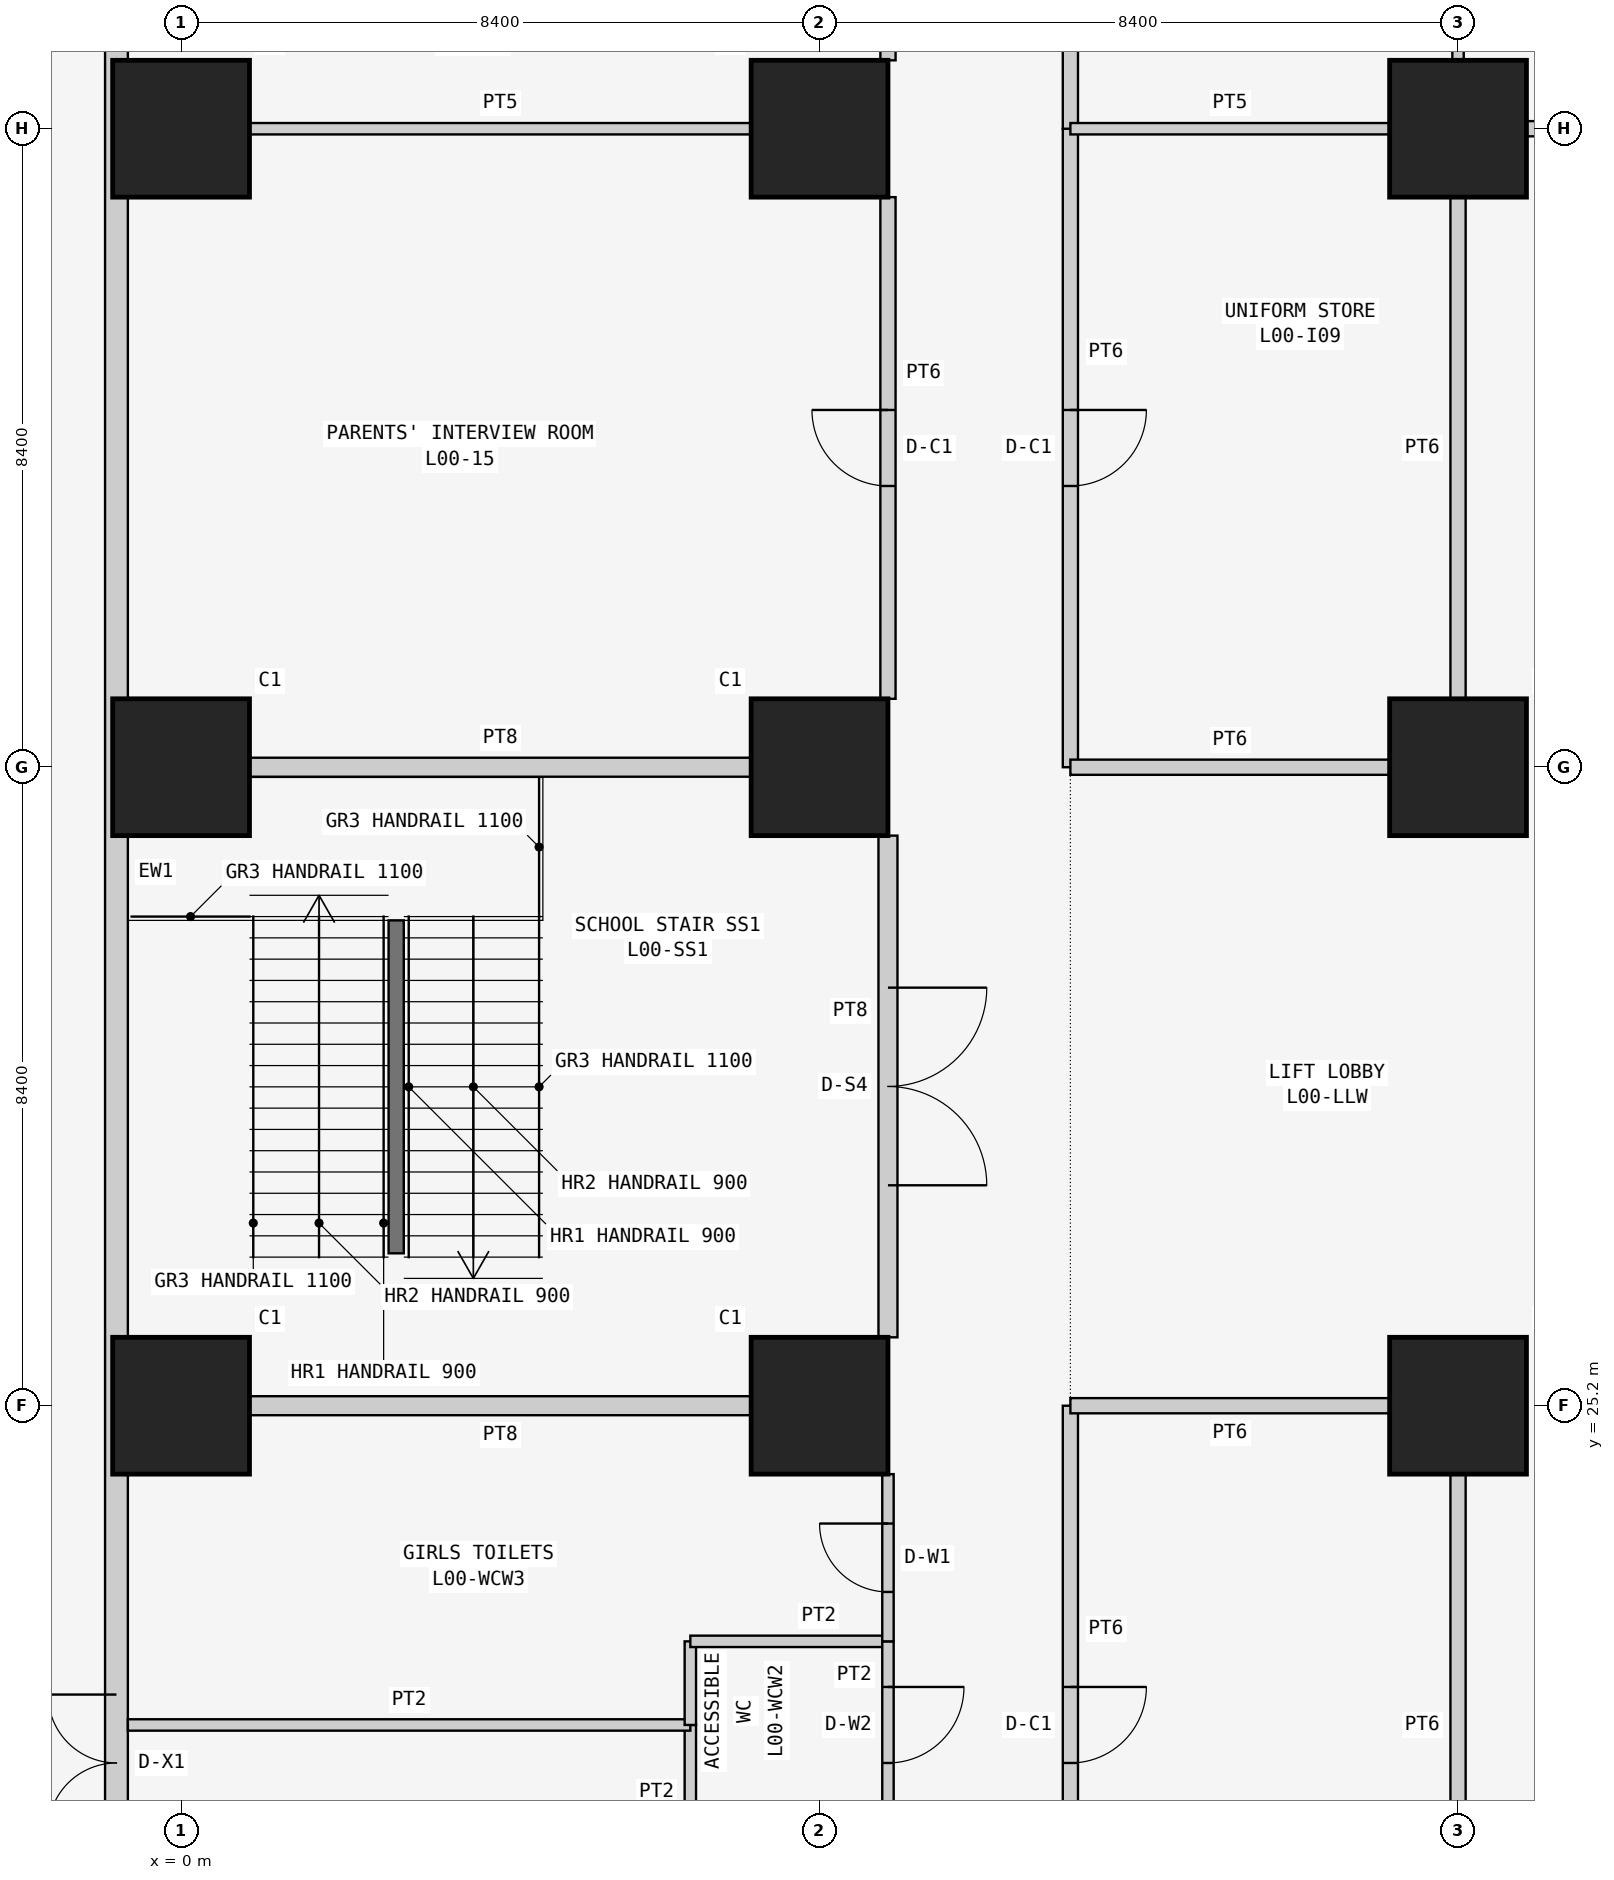
"""IFC4 building model, lengths in metres.
Left out: names, types, materials, properties, quantities, classifications, styles, units other than length and angle.
Written with IfcOpenShell. Run it as: python <this file> out.ifc"""

import sys

from ifc_helpers import new_model, si_unit, direction, frame, frame_2d, origin, origin_2d, place, context, subcontext, project, spatial, rectangle, extrude, element, fill, save


model = new_model("IFC4")
c1 = context("Model", 3, precision=1e-05, world=origin(), true_north=direction((0.0, 1.0)))
c2 = subcontext(c1, "Body", "Model", "MODEL_VIEW")
j1 = project(units=[si_unit("LENGTHUNIT", "METRE"), si_unit("PLANEANGLEUNIT", "RADIAN")], contexts=[c1])
p1 = place(None, origin())
s1 = spatial("IfcSite", under=j1, at=p1, CompositionType="ELEMENT")
p2 = place(p1, origin())
s2 = spatial("IfcBuilding", under=s1, at=p2, CompositionType="ELEMENT")
p3 = place(p2, origin())
s3 = spatial("IfcBuildingStorey", under=s2, at=p3, CompositionType="ELEMENT", Elevation=0.0)
for number, where, z_axis, x_axis in (
    (1, (0.0, 25.2, 0.0), (0.0, 0.0, 1.0), (1.0, 0.0, 0.0)),
    (2, (0.0, 33.6, 0.0), (0.0, 0.0, 1.0), (1.0, 0.0, 0.0)),
    (3, (0.0, 42.0, 0.0), (0.0, 0.0, 1.0), (1.0, 0.0, 0.0)),
    (4, (8.4, 25.2, 0.0), (0.0, 0.0, 1.0), (1.0, 0.0, 0.0)),
    (5, (8.4, 33.6, 0.0), (0.0, 0.0, 1.0), (1.0, 0.0, 0.0)),
    (6, (8.4, 42.0, 0.0), (0.0, 0.0, 1.0), (1.0, 0.0, 0.0)),
    (7, (16.8, 25.2, 0.0), (0.0, 0.0, 1.0), (1.0, 0.0, 0.0)),
    (8, (16.8, 33.6, 0.0), (0.0, 0.0, 1.0), (1.0, 0.0, 0.0)),
    (9, (16.8, 42.0, 0.0), (0.0, 0.0, 1.0), (1.0, 0.0, 0.0)),
):
    element("IfcColumn", number, at=place(p3, frame(where, z_axis=z_axis, x_axis=x_axis)), inside=s3, PredefinedType="COLUMN", context=c2, shape_type="SweptSolid", body=[
        extrude(rectangle(XDim=1.8, YDim=1.8, at=origin_2d()), origin(), (0.0, 0.0, 1.0), 6.0),
    ])
p4 = place(p3, frame((-0.85, 58.4, 0.0), z_axis=(0.0, 0.0, 1.0), x_axis=(0.0, -1.0, 0.0)))
e10 = element("IfcWall", 10, at=p4, inside=s3, PredefinedType="SOLIDWALL", context=c2, shape_type="SweptSolid", body=[
    extrude(rectangle(XDim=74.8, YDim=0.3, at=frame_2d((37.4, 0.0))), origin(), (0.0, 0.0, 1.0), 5.8),
])
p5 = place(p4, frame((68.0, 0.0, 0.0)))
e11 = element("IfcOpeningElement", 11, at=p5, cuts=e10, PredefinedType="OPENING", context=c2, shape_type="SweptSolid", body=[
    extrude(rectangle(XDim=1.8, YDim=2.4, at=frame_2d((0.9, 1.2))), frame((0.0, 0.16, 0.0), z_axis=(0.0, -1.0, 0.0), x_axis=(1.0, 0.0, 0.0)), (0.0, 0.0, 1.0), 0.32),
])
p6 = place(p4, frame((37.0, 0.0, 0.0)))
e12 = element("IfcOpeningElement", 12, at=p6, cuts=e10, PredefinedType="OPENING", context=c2, shape_type="SweptSolid", body=[
    extrude(rectangle(XDim=1.8, YDim=2.4, at=frame_2d((0.9, 1.2))), frame((0.0, 0.16, 0.0), z_axis=(0.0, -1.0, 0.0), x_axis=(1.0, 0.0, 0.0)), (0.0, 0.0, 1.0), 0.32),
])
p7 = place(p4, frame((11.0, 0.0, 0.0)))
e13 = element("IfcOpeningElement", 13, at=p7, cuts=e10, PredefinedType="OPENING", context=c2, shape_type="SweptSolid", body=[
    extrude(rectangle(XDim=1.8, YDim=2.4, at=frame_2d((0.9, 1.2))), frame((0.0, 0.16, 0.0), z_axis=(0.0, -1.0, 0.0), x_axis=(1.0, 0.0, 0.0)), (0.0, 0.0, 1.0), 0.32),
])
p8 = place(p3, frame((6.7, 21.0, 0.0), z_axis=(0.0, 0.0, 1.0), x_axis=(0.0, -1.0, 0.0)))
e14 = element("IfcWall", 14, at=p8, inside=s3, PredefinedType="PARTITIONING", context=c2, shape_type="SweptSolid", body=[
    extrude(rectangle(XDim=1.1, YDim=0.15, at=frame_2d((0.55, 0.0))), origin(), (0.0, 0.0, 1.0), 5.8),
])
p9 = place(p3, frame((-0.7, 21.0, 0.0), z_axis=(0.0, 0.0, 1.0), x_axis=(1.0, 0.0, 0.0)))
e15 = element("IfcWall", 15, at=p9, inside=s3, PredefinedType="PARTITIONING", context=c2, shape_type="SweptSolid", body=[
    extrude(rectangle(XDim=7.4, YDim=0.15, at=frame_2d((3.7, 0.0))), origin(), (0.0, 0.0, 1.0), 5.8),
])
p10 = place(p3, frame((6.7, 21.0, 0.0), z_axis=(0.0, 0.0, 1.0), x_axis=(0.0, 1.0, 0.0)))
e16 = element("IfcWall", 16, at=p10, inside=s3, PredefinedType="PARTITIONING", context=c2, shape_type="SweptSolid", body=[
    extrude(rectangle(XDim=1.1, YDim=0.15, at=frame_2d((0.55, 0.0))), origin(), (0.0, 0.0, 1.0), 5.8),
])
p11 = place(p3, frame((6.7, 22.1, 0.0), z_axis=(0.0, 0.0, 1.0), x_axis=(1.0, 0.0, 0.0)))
e17 = element("IfcWall", 17, at=p11, inside=s3, PredefinedType="PARTITIONING", context=c2, shape_type="SweptSolid", body=[
    extrude(rectangle(XDim=2.6, YDim=0.15, at=frame_2d((1.3, 0.0))), origin(), (0.0, 0.0, 1.0), 5.8),
])
p12 = place(p3, frame((9.3, 22.1, 0.0), z_axis=(0.0, 0.0, 1.0), x_axis=(0.0, -1.0, 0.0)))
e18 = element("IfcWall", 18, at=p12, inside=s3, PredefinedType="PARTITIONING", context=c2, shape_type="SweptSolid", body=[
    extrude(rectangle(XDim=2.2, YDim=0.15, at=frame_2d((1.1, 0.0))), origin(), (0.0, 0.0, 1.0), 5.8),
])
p13 = place(p12, frame((0.6, 0.0, 0.0)))
e19 = element("IfcOpeningElement", 19, at=p13, cuts=e18, PredefinedType="OPENING", context=c2, shape_type="SweptSolid", body=[
    extrude(rectangle(XDim=1.0, YDim=2.1, at=frame_2d((0.5, 1.05))), frame((0.0, 0.085, 0.0), z_axis=(0.0, -1.0, 0.0), x_axis=(1.0, 0.0, 0.0)), (0.0, 0.0, 1.0), 0.17),
])
p14 = place(p3, frame((0.9, 25.2, 0.0), z_axis=(0.0, 0.0, 1.0), x_axis=(1.0, 0.0, 0.0)))
e20 = element("IfcWall", 20, at=p14, inside=s3, PredefinedType="SOLIDWALL", context=c2, shape_type="SweptSolid", body=[
    extrude(rectangle(XDim=6.6, YDim=0.25, at=frame_2d((3.3, 0.0))), origin(), (0.0, 0.0, 1.0), 5.043),
])
p15 = place(p3, frame((9.3, 24.3, 0.0), z_axis=(0.0, 0.0, 1.0), x_axis=(0.0, -1.0, 0.0)))
e21 = element("IfcWall", 21, at=p15, inside=s3, PredefinedType="PARTITIONING", context=c2, shape_type="SweptSolid", body=[
    extrude(rectangle(XDim=2.2, YDim=0.15, at=frame_2d((1.1, 0.0))), origin(), (0.0, 0.0, 1.0), 5.8),
])
p16 = place(p15, frame((0.65, 0.0, 0.0)))
e22 = element("IfcOpeningElement", 22, at=p16, cuts=e21, PredefinedType="OPENING", context=c2, shape_type="SweptSolid", body=[
    extrude(rectangle(XDim=0.9, YDim=2.1, at=frame_2d((0.45, 1.05))), frame((0.0, 0.085, 0.0), z_axis=(0.0, -1.0, 0.0), x_axis=(1.0, 0.0, 0.0)), (0.0, 0.0, 1.0), 0.17),
])
p17 = place(p3, frame((0.9, 33.6, 0.0), z_axis=(0.0, 0.0, 1.0), x_axis=(1.0, 0.0, 0.0)))
e23 = element("IfcWall", 23, at=p17, inside=s3, PredefinedType="SOLIDWALL", context=c2, shape_type="SweptSolid", body=[
    extrude(rectangle(XDim=6.6, YDim=0.25, at=frame_2d((3.3, 0.0))), origin(), (0.0, 0.0, 1.0), 5.043),
])
p18 = place(p3, frame((9.3, 32.7, 0.0), z_axis=(0.0, 0.0, 1.0), x_axis=(0.0, -1.0, 0.0)))
e24 = element("IfcWall", 24, at=p18, inside=s3, PredefinedType="SOLIDWALL", context=c2, shape_type="SweptSolid", body=[
    extrude(rectangle(XDim=6.6, YDim=0.25, at=frame_2d((3.3, 0.0))), origin(), (0.0, 0.0, 1.0), 5.8),
])
p19 = place(p18, frame((2.0, 0.0, 0.0)))
e25 = element("IfcOpeningElement", 25, at=p19, cuts=e24, PredefinedType="OPENING", context=c2, shape_type="SweptSolid", body=[
    extrude(rectangle(XDim=2.6, YDim=2.4, at=frame_2d((1.3, 1.2))), frame((0.0, 0.135, 0.0), z_axis=(0.0, -1.0, 0.0), x_axis=(1.0, 0.0, 0.0)), (0.0, 0.0, 1.0), 0.27),
])
p20 = place(p3, frame((0.9, 42.0, 0.0), z_axis=(0.0, 0.0, 1.0), x_axis=(1.0, 0.0, 0.0)))
e26 = element("IfcWall", 26, at=p20, inside=s3, PredefinedType="PARTITIONING", context=c2, shape_type="SweptSolid", body=[
    extrude(rectangle(XDim=6.6, YDim=0.15, at=frame_2d((3.3, 0.0))), origin(), (0.0, 0.0, 1.0), 5.043),
])
p21 = place(p3, frame((9.3, 41.1, 0.0), z_axis=(0.0, 0.0, 1.0), x_axis=(0.0, -1.0, 0.0)))
e27 = element("IfcWall", 27, at=p21, inside=s3, PredefinedType="PARTITIONING", context=c2, shape_type="SweptSolid", body=[
    extrude(rectangle(XDim=6.6, YDim=0.2, at=frame_2d((3.3, 0.0))), origin(), (0.0, 0.0, 1.0), 5.8),
])
p22 = place(p21, frame((2.8, 0.0, 0.0)))
e28 = element("IfcOpeningElement", 28, at=p22, cuts=e27, PredefinedType="OPENING", context=c2, shape_type="SweptSolid", body=[
    extrude(rectangle(XDim=1.0, YDim=2.1, at=frame_2d((0.5, 1.05))), frame((0.0, 0.11, 0.0), z_axis=(0.0, -1.0, 0.0), x_axis=(1.0, 0.0, 0.0)), (0.0, 0.0, 1.0), 0.22),
])
p23 = place(p3, frame((9.3, 44.6, 0.0), z_axis=(0.0, 0.0, 1.0), x_axis=(0.0, -1.0, 0.0)))
e29 = element("IfcWall", 29, at=p23, inside=s3, PredefinedType="PARTITIONING", context=c2, shape_type="SweptSolid", body=[
    extrude(rectangle(XDim=1.7, YDim=0.2, at=frame_2d((0.85, 0.0))), origin(), (0.0, 0.0, 1.0), 5.8),
])
p24 = place(p23, frame((0.35, 0.0, 0.0)))
e30 = element("IfcOpeningElement", 30, at=p24, cuts=e29, PredefinedType="OPENING", context=c2, shape_type="SweptSolid", body=[
    extrude(rectangle(XDim=1.0, YDim=2.1, at=frame_2d((0.5, 1.05))), frame((0.0, 0.11, 0.0), z_axis=(0.0, -1.0, 0.0), x_axis=(1.0, 0.0, 0.0)), (0.0, 0.0, 1.0), 0.22),
])
p25 = place(p3, frame((11.7, 25.2, 0.0), z_axis=(0.0, 0.0, 1.0), x_axis=(0.0, -1.0, 0.0)))
e31 = element("IfcWall", 31, at=p25, inside=s3, PredefinedType="PARTITIONING", context=c2, shape_type="SweptSolid", body=[
    extrude(rectangle(XDim=8.4, YDim=0.2, at=frame_2d((4.2, 0.0))), origin(), (0.0, 0.0, 1.0), 5.8),
])
p26 = place(p25, frame((3.7, 0.0, 0.0)))
e32 = element("IfcOpeningElement", 32, at=p26, cuts=e31, PredefinedType="OPENING", context=c2, shape_type="SweptSolid", body=[
    extrude(rectangle(XDim=1.0, YDim=2.1, at=frame_2d((0.5, 1.05))), frame((0.0, 0.11, 0.0), z_axis=(0.0, -1.0, 0.0), x_axis=(1.0, 0.0, 0.0)), (0.0, 0.0, 1.0), 0.22),
])
p27 = place(p3, frame((11.7, 42.0, 0.0), z_axis=(0.0, 0.0, 1.0), x_axis=(0.0, -1.0, 0.0)))
e33 = element("IfcWall", 33, at=p27, inside=s3, PredefinedType="PARTITIONING", context=c2, shape_type="SweptSolid", body=[
    extrude(rectangle(XDim=8.4, YDim=0.2, at=frame_2d((4.2, 0.0))), origin(), (0.0, 0.0, 1.0), 5.8),
])
p28 = place(p27, frame((3.7, 0.0, 0.0)))
e34 = element("IfcOpeningElement", 34, at=p28, cuts=e33, PredefinedType="OPENING", context=c2, shape_type="SweptSolid", body=[
    extrude(rectangle(XDim=1.0, YDim=2.1, at=frame_2d((0.5, 1.05))), frame((0.0, 0.11, 0.0), z_axis=(0.0, -1.0, 0.0), x_axis=(1.0, 0.0, 0.0)), (0.0, 0.0, 1.0), 0.22),
])
p29 = place(p3, frame((11.7, 47.1, 0.0), z_axis=(0.0, 0.0, 1.0), x_axis=(0.0, -1.0, 0.0)))
e35 = element("IfcWall", 35, at=p29, inside=s3, PredefinedType="PARTITIONING", context=c2, shape_type="SweptSolid", body=[
    extrude(rectangle(XDim=5.1, YDim=0.2, at=frame_2d((2.55, 0.0))), origin(), (0.0, 0.0, 1.0), 5.8),
])
p30 = place(p3, frame((15.9, 25.2, 0.0), z_axis=(0.0, 0.0, 1.0), x_axis=(-1.0, 0.0, 0.0)))
e36 = element("IfcWall", 36, at=p30, inside=s3, PredefinedType="PARTITIONING", context=c2, shape_type="SweptSolid", body=[
    extrude(rectangle(XDim=4.2, YDim=0.2, at=frame_2d((2.1, 0.0))), origin(), (0.0, 0.0, 1.0), 5.043),
])
p31 = place(p3, frame((16.8, 17.7, 0.0), z_axis=(0.0, 0.0, 1.0), x_axis=(0.0, 1.0, 0.0)))
e37 = element("IfcWall", 37, at=p31, inside=s3, PredefinedType="PARTITIONING", context=c2, shape_type="SweptSolid", body=[
    extrude(rectangle(XDim=6.6, YDim=0.2, at=frame_2d((3.3, 0.0))), origin(), (0.0, 0.0, 1.0), 5.043),
])
p32 = place(p3, frame((11.7, 33.6, 0.0), z_axis=(0.0, 0.0, 1.0), x_axis=(1.0, 0.0, 0.0)))
e38 = element("IfcWall", 38, at=p32, inside=s3, PredefinedType="PARTITIONING", context=c2, shape_type="SweptSolid", body=[
    extrude(rectangle(XDim=4.2, YDim=0.2, at=frame_2d((2.1, 0.0))), origin(), (0.0, 0.0, 1.0), 5.043),
])
p33 = place(p3, frame((16.8, 34.5, 0.0), z_axis=(0.0, 0.0, 1.0), x_axis=(0.0, 1.0, 0.0)))
e39 = element("IfcWall", 39, at=p33, inside=s3, PredefinedType="PARTITIONING", context=c2, shape_type="SweptSolid", body=[
    extrude(rectangle(XDim=6.6, YDim=0.2, at=frame_2d((3.3, 0.0))), origin(), (0.0, 0.0, 1.0), 5.043),
])
p34 = place(p3, frame((17.7, 42.0, 0.0), z_axis=(0.0, 0.0, 1.0), x_axis=(1.0, 0.0, 0.0)))
e40 = element("IfcWall", 40, at=p34, inside=s3, PredefinedType="PARTITIONING", context=c2, shape_type="SweptSolid", body=[
    extrude(rectangle(XDim=2.8, YDim=0.2, at=frame_2d((1.4, 0.0))), origin(), (0.0, 0.0, 1.0), 5.043),
])
p35 = place(p3, frame((11.7, 42.0, 0.0), z_axis=(0.0, 0.0, 1.0), x_axis=(1.0, 0.0, 0.0)))
e41 = element("IfcWall", 41, at=p35, inside=s3, PredefinedType="PARTITIONING", context=c2, shape_type="SweptSolid", body=[
    extrude(rectangle(XDim=4.2, YDim=0.15, at=frame_2d((2.1, 0.0))), origin(), (0.0, 0.0, 1.0), 5.043),
])
p36 = place(p3, frame((16.8, 47.1, 0.0), z_axis=(0.0, 0.0, 1.0), x_axis=(0.0, -1.0, 0.0)))
e42 = element("IfcWall", 42, at=p36, inside=s3, PredefinedType="PARTITIONING", context=c2, shape_type="SweptSolid", body=[
    extrude(rectangle(XDim=4.2, YDim=0.15, at=frame_2d((2.1, 0.0))), origin(), (0.0, 0.0, 1.0), 5.043),
])
p37 = place(p3, frame((2.83, 27.205, 0.0), z_axis=(0.0, 0.0, 1.0), x_axis=(0.0, 1.0, 0.0)))
e43 = element("IfcWall", 43, at=p37, inside=s3, PredefinedType="SOLIDWALL", context=c2, shape_type="SweptSolid", body=[
    extrude(rectangle(XDim=4.38, YDim=0.2, at=frame_2d((2.19, 0.0))), origin(), (0.0, 0.0, 1.0), 6.0),
])
p38 = place(p6, frame((1.8, 0.0, 0.0), z_axis=(0.0, 0.0, 1.0), x_axis=(-1.0, 0.0, 0.0)))
e44 = element("IfcDoor", 44, at=p38, inside=s3, OperationType="DOUBLE_DOOR_SINGLE_SWING", PredefinedType="DOOR", context=c2, shape_type="SweptSolid", body=[
    extrude(rectangle(XDim=1.8, YDim=2.4, at=frame_2d((0.9, 1.2))), frame((0.0, 0.025, 0.0), z_axis=(0.0, -1.0, 0.0), x_axis=(1.0, 0.0, 0.0)), (0.0, 0.0, 1.0), 0.05),
])
fill(e12, e44)
p39 = place(p13, origin())
e45 = element("IfcDoor", 45, at=p39, inside=s3, OperationType="SINGLE_SWING_LEFT", PredefinedType="DOOR", context=c2, shape_type="SweptSolid", body=[
    extrude(rectangle(XDim=1.0, YDim=2.1, at=frame_2d((0.5, 1.05))), frame((0.0, 0.025, 0.0), z_axis=(0.0, -1.0, 0.0), x_axis=(1.0, 0.0, 0.0)), (0.0, 0.0, 1.0), 0.05),
])
fill(e19, e45)
p40 = place(p16, frame((0.9, 0.0, 0.0), z_axis=(0.0, 0.0, 1.0), x_axis=(-1.0, 0.0, 0.0)))
e46 = element("IfcDoor", 46, at=p40, inside=s3, OperationType="SINGLE_SWING_RIGHT", PredefinedType="DOOR", context=c2, shape_type="SweptSolid", body=[
    extrude(rectangle(XDim=0.9, YDim=2.1, at=frame_2d((0.45, 1.05))), frame((0.0, 0.025, 0.0), z_axis=(0.0, -1.0, 0.0), x_axis=(1.0, 0.0, 0.0)), (0.0, 0.0, 1.0), 0.05),
])
fill(e22, e46)
p41 = place(p19, origin())
e47 = element("IfcDoor", 47, at=p41, inside=s3, OperationType="DOUBLE_DOOR_SINGLE_SWING", PredefinedType="DOOR", context=c2, shape_type="SweptSolid", body=[
    extrude(rectangle(XDim=2.6, YDim=2.4, at=frame_2d((1.3, 1.2))), frame((0.0, 0.025, 0.0), z_axis=(0.0, -1.0, 0.0), x_axis=(1.0, 0.0, 0.0)), (0.0, 0.0, 1.0), 0.05),
])
fill(e25, e47)
p42 = place(p22, frame((1.0, 0.0, 0.0), z_axis=(0.0, 0.0, 1.0), x_axis=(-1.0, 0.0, 0.0)))
e48 = element("IfcDoor", 48, at=p42, inside=s3, OperationType="SINGLE_SWING_RIGHT", PredefinedType="DOOR", context=c2, shape_type="SweptSolid", body=[
    extrude(rectangle(XDim=1.0, YDim=2.1, at=frame_2d((0.5, 1.05))), frame((0.0, 0.025, 0.0), z_axis=(0.0, -1.0, 0.0), x_axis=(1.0, 0.0, 0.0)), (0.0, 0.0, 1.0), 0.05),
])
fill(e28, e48)
p43 = place(p26, origin())
e49 = element("IfcDoor", 49, at=p43, inside=s3, OperationType="SINGLE_SWING_LEFT", PredefinedType="DOOR", context=c2, shape_type="SweptSolid", body=[
    extrude(rectangle(XDim=1.0, YDim=2.1, at=frame_2d((0.5, 1.05))), frame((0.0, 0.025, 0.0), z_axis=(0.0, -1.0, 0.0), x_axis=(1.0, 0.0, 0.0)), (0.0, 0.0, 1.0), 0.05),
])
fill(e32, e49)
p44 = place(p28, origin())
e50 = element("IfcDoor", 50, at=p44, inside=s3, OperationType="SINGLE_SWING_LEFT", PredefinedType="DOOR", context=c2, shape_type="SweptSolid", body=[
    extrude(rectangle(XDim=1.0, YDim=2.1, at=frame_2d((0.5, 1.05))), frame((0.0, 0.025, 0.0), z_axis=(0.0, -1.0, 0.0), x_axis=(1.0, 0.0, 0.0)), (0.0, 0.0, 1.0), 0.05),
])
fill(e34, e50)
save(model, sys.argv[1])
